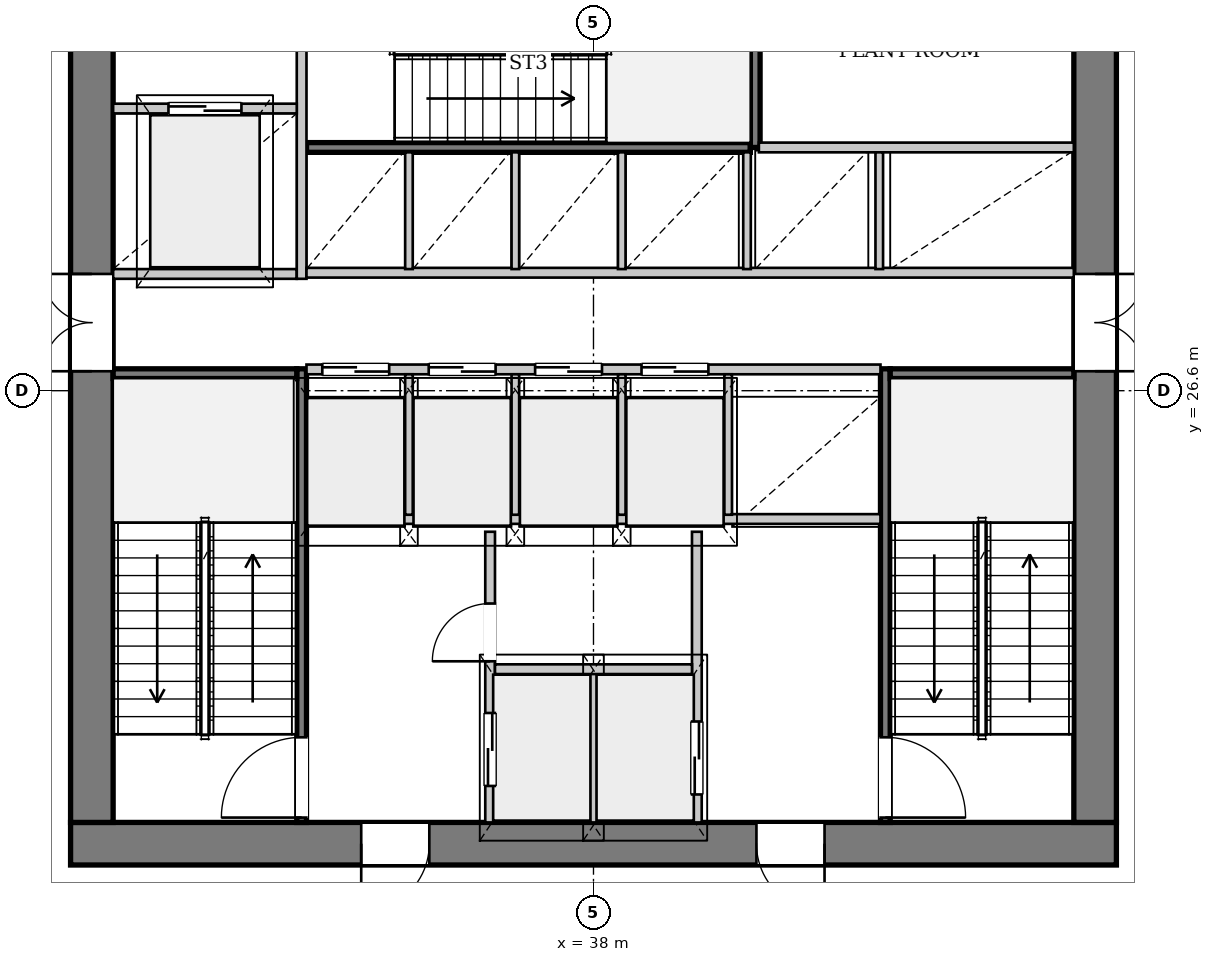
"""IFC4 building model, lengths in metres.
Left out: names, types, materials, properties, quantities, classifications, styles, units other than length and angle.
Written with IfcOpenShell. Run it as: python <this file> out.ifc"""

import sys

from ifc_helpers import new_model, si_unit, direction, frame, frame_2d, origin, place, context, subcontext, project, spatial, rectangle, extrude, source, transform, mapped, element, fill, save


model = new_model("IFC4")
c1 = context("Model", 3, precision=1e-05, world=origin(), true_north=direction((0.0, 1.0)))
c2 = subcontext(c1, "Body", "Model", "MODEL_VIEW")
j1 = project(units=[si_unit("LENGTHUNIT", "METRE"), si_unit("PLANEANGLEUNIT", "RADIAN")], contexts=[c1])
p1 = place(None, origin())
s1 = spatial("IfcSite", under=j1, at=p1, CompositionType="ELEMENT")
p2 = place(p1, origin())
s2 = spatial("IfcBuilding", under=s1, at=p2, CompositionType="ELEMENT")
p3 = place(p2, frame((0.0, 0.0, 79.9)))
s3 = spatial("IfcBuildingStorey", under=s2, at=p3, CompositionType="ELEMENT", Elevation=79.9)
p4 = place(p3, frame((46.6, 19.15, 0.0), z_axis=(0.0, 0.0, 1.0), x_axis=(-1.0, 0.0, 0.0)))
e1 = element("IfcWall", 1, at=p4, inside=s3, PredefinedType="SHEAR", context=c2, shape_type="SweptSolid", body=[
    extrude(rectangle(XDim=17.2, YDim=0.7, at=frame_2d((8.6, 0.0))), origin(), (0.0, 0.0, 1.0), 4.25),
])
p5 = place(p4, frame((4.8, 0.0, 0.0)))
e2 = element("IfcOpeningElement", 2, at=p5, cuts=e1, PredefinedType="OPENING", context=c2, shape_type="SweptSolid", body=[
    extrude(rectangle(XDim=1.12, YDim=2.25, at=frame_2d((0.56, 1.125))), frame((0.0, 0.36, 0.0), z_axis=(0.0, -1.0, 0.0), x_axis=(1.0, 0.0, 0.0)), (0.0, 0.0, 1.0), 0.72),
])
p6 = place(p4, frame((11.3, 0.0, 0.0)))
e3 = element("IfcOpeningElement", 3, at=p6, cuts=e1, PredefinedType="OPENING", context=c2, shape_type="SweptSolid", body=[
    extrude(rectangle(XDim=1.12, YDim=2.25, at=frame_2d((0.56, 1.125))), frame((0.0, 0.36, 0.0), z_axis=(0.0, -1.0, 0.0), x_axis=(1.0, 0.0, 0.0)), (0.0, 0.0, 1.0), 0.72),
])
p7 = place(p3, frame((29.75, 19.5, 0.0), z_axis=(0.0, 0.0, 1.0), x_axis=(0.0, 1.0, 0.0)))
e4 = element("IfcWall", 4, at=p7, inside=s3, PredefinedType="SHEAR", context=c2, shape_type="SweptSolid", body=[
    extrude(rectangle(XDim=14.2, YDim=0.7, at=frame_2d((7.1, 0.0))), origin(), (0.0, 0.0, 1.0), 4.25),
])
p8 = place(p7, frame((7.42, 0.0, 0.0)))
e5 = element("IfcOpeningElement", 5, at=p8, cuts=e4, PredefinedType="OPENING", context=c2, shape_type="SweptSolid", body=[
    extrude(rectangle(XDim=1.6, YDim=2.2, at=frame_2d((0.8, 1.1))), frame((0.0, 0.36, 0.0), z_axis=(0.0, -1.0, 0.0), x_axis=(1.0, 0.0, 0.0)), (0.0, 0.0, 1.0), 0.72),
])
p9 = place(p3, frame((46.25, 33.7, 0.0), z_axis=(0.0, 0.0, 1.0), x_axis=(0.0, -1.0, 0.0)))
e6 = element("IfcWall", 6, at=p9, inside=s3, PredefinedType="SHEAR", context=c2, shape_type="SweptSolid", body=[
    extrude(rectangle(XDim=14.2, YDim=0.7, at=frame_2d((7.1, 0.0))), origin(), (0.0, 0.0, 1.0), 4.25),
])
p10 = place(p9, frame((5.18, 0.0, 0.0)))
e7 = element("IfcOpeningElement", 7, at=p10, cuts=e6, PredefinedType="OPENING", context=c2, shape_type="SweptSolid", body=[
    extrude(rectangle(XDim=1.6, YDim=2.2, at=frame_2d((0.8, 1.1))), frame((0.0, 0.36, 0.0), z_axis=(0.0, -1.0, 0.0), x_axis=(1.0, 0.0, 0.0)), (0.0, 0.0, 1.0), 0.72),
])
p11 = place(p3, frame((33.2, 19.5, 0.0), z_axis=(0.0, 0.0, 1.0), x_axis=(0.0, 1.0, 0.0)))
e8 = element("IfcWall", 8, at=p11, inside=s3, PredefinedType="PARTITIONING", context=c2, shape_type="SweptSolid", body=[
    extrude(rectangle(XDim=7.46, YDim=0.16, at=frame_2d((3.73, 0.0))), origin(), (0.0, 0.0, 1.0), 4.25),
])
p12 = place(p11, frame((0.08, 0.0, 0.0)))
e9 = element("IfcOpeningElement", 9, at=p12, cuts=e8, PredefinedType="OPENING", context=c2, shape_type="SweptSolid", body=[
    extrude(rectangle(XDim=1.32, YDim=2.2, at=frame_2d((0.66, 1.1))), frame((0.0, 0.09, 0.0), z_axis=(0.0, -1.0, 0.0), x_axis=(1.0, 0.0, 0.0)), (0.0, 0.0, 1.0), 0.18),
])
p13 = place(p3, frame((30.1, 26.88, 0.0), z_axis=(0.0, 0.0, 1.0), x_axis=(1.0, 0.0, 0.0)))
e10 = element("IfcWall", 10, at=p13, inside=s3, PredefinedType="PARTITIONING", context=c2, shape_type="SweptSolid", body=[
    extrude(rectangle(XDim=3.02, YDim=0.16, at=frame_2d((1.51, 0.0))), origin(), (0.0, 0.0, 1.0), 4.25),
])
p14 = place(p3, frame((42.8, 26.96, 0.0), z_axis=(0.0, 0.0, 1.0), x_axis=(0.0, -1.0, 0.0)))
e11 = element("IfcWall", 11, at=p14, inside=s3, PredefinedType="PARTITIONING", context=c2, shape_type="SweptSolid", body=[
    extrude(rectangle(XDim=7.46, YDim=0.16, at=frame_2d((3.73, 0.0))), origin(), (0.0, 0.0, 1.0), 4.25),
])
p15 = place(p14, frame((6.06, 0.0, 0.0)))
e12 = element("IfcOpeningElement", 12, at=p15, cuts=e11, PredefinedType="OPENING", context=c2, shape_type="SweptSolid", body=[
    extrude(rectangle(XDim=1.32, YDim=2.2, at=frame_2d((0.66, 1.1))), frame((0.0, 0.09, 0.0), z_axis=(0.0, -1.0, 0.0), x_axis=(1.0, 0.0, 0.0)), (0.0, 0.0, 1.0), 0.18),
])
p16 = place(p3, frame((42.88, 26.88, 0.0), z_axis=(0.0, 0.0, 1.0), x_axis=(1.0, 0.0, 0.0)))
e13 = element("IfcWall", 13, at=p16, inside=s3, PredefinedType="PARTITIONING", context=c2, shape_type="SweptSolid", body=[
    extrude(rectangle(XDim=3.02, YDim=0.16, at=frame_2d((1.51, 0.0))), origin(), (0.0, 0.0, 1.0), 4.25),
])
p17 = place(p3, frame((33.28, 30.6, 0.0), z_axis=(0.0, 0.0, 1.0), x_axis=(1.0, 0.0, 0.0)))
e14 = element("IfcWall", 14, at=p17, inside=s3, PredefinedType="PARTITIONING", context=c2, shape_type="SweptSolid", body=[
    extrude(rectangle(XDim=7.3, YDim=0.16, at=frame_2d((3.65, 0.0))), origin(), (0.0, 0.0, 1.0), 4.25),
])
p18 = place(p3, frame((40.66, 30.6, 0.0), z_axis=(0.0, 0.0, 1.0), x_axis=(0.0, 1.0, 0.0)))
e15 = element("IfcWall", 15, at=p18, inside=s3, PredefinedType="PARTITIONING", context=c2, shape_type="SweptSolid", body=[
    extrude(rectangle(XDim=3.1, YDim=0.16, at=frame_2d((1.55, 0.0))), origin(), (0.0, 0.0, 1.0), 4.25),
])
p19 = place(p3, frame((36.3, 19.5, 0.0), z_axis=(0.0, 0.0, 1.0), x_axis=(0.0, 1.0, 0.0)))
e16 = element("IfcWall", 16, at=p19, inside=s3, PredefinedType="PARTITIONING", context=c2, shape_type="SweptSolid", body=[
    extrude(rectangle(XDim=4.78, YDim=0.16, at=frame_2d((2.39, 0.0))), origin(), (0.0, 0.0, 1.0), 4.25),
])
p20 = place(p19, frame((0.6, 0.0, 0.0)))
e17 = element("IfcOpeningElement", 17, at=p20, cuts=e16, PredefinedType="OPENING", context=c2, shape_type="SweptSolid", body=[
    extrude(rectangle(XDim=1.2, YDim=2.2, at=frame_2d((0.6, 1.1))), frame((0.0, 0.09, 0.0), z_axis=(0.0, -1.0, 0.0), x_axis=(1.0, 0.0, 0.0)), (0.0, 0.0, 1.0), 0.18),
])
p21 = place(p19, frame((2.65, 0.0, 0.0)))
e18 = element("IfcOpeningElement", 18, at=p21, cuts=e16, PredefinedType="OPENING", context=c2, shape_type="SweptSolid", body=[
    extrude(rectangle(XDim=0.95, YDim=2.1, at=frame_2d((0.475, 1.05))), frame((0.0, 0.09, 0.0), z_axis=(0.0, -1.0, 0.0), x_axis=(1.0, 0.0, 0.0)), (0.0, 0.0, 1.0), 0.18),
])
p22 = place(p3, frame((39.7, 24.28, 0.0), z_axis=(0.0, 0.0, 1.0), x_axis=(0.0, -1.0, 0.0)))
e19 = element("IfcWall", 19, at=p22, inside=s3, PredefinedType="PARTITIONING", context=c2, shape_type="SweptSolid", body=[
    extrude(rectangle(XDim=4.78, YDim=0.16, at=frame_2d((2.39, 0.0))), origin(), (0.0, 0.0, 1.0), 4.25),
])
p23 = place(p22, frame((3.12, 0.0, 0.0)))
e20 = element("IfcOpeningElement", 20, at=p23, cuts=e19, PredefinedType="OPENING", context=c2, shape_type="SweptSolid", body=[
    extrude(rectangle(XDim=1.2, YDim=2.2, at=frame_2d((0.6, 1.1))), frame((0.0, 0.09, 0.0), z_axis=(0.0, -1.0, 0.0), x_axis=(1.0, 0.0, 0.0)), (0.0, 0.0, 1.0), 0.18),
])
p24 = place(p3, frame((38.0, 19.5, 0.0), z_axis=(0.0, 0.0, 1.0), x_axis=(0.0, 1.0, 0.0)))
e21 = element("IfcWall", 21, at=p24, inside=s3, PredefinedType="PARTITIONING", context=c2, shape_type="SweptSolid", body=[
    extrude(rectangle(XDim=2.46, YDim=0.125, at=frame_2d((1.23, 0.0))), origin(), (0.0, 0.0, 1.0), 4.25),
])
p25 = place(p3, frame((36.38, 22.02, 0.0), z_axis=(0.0, 0.0, 1.0), x_axis=(1.0, 0.0, 0.0)))
e22 = element("IfcWall", 22, at=p25, inside=s3, PredefinedType="PARTITIONING", context=c2, shape_type="SweptSolid", body=[
    extrude(rectangle(XDim=3.24, YDim=0.16, at=frame_2d((1.62, 0.0))), origin(), (0.0, 0.0, 1.0), 4.25),
])
p26 = place(p3, frame((33.28, 24.49, 0.0), z_axis=(0.0, 0.0, 1.0), x_axis=(1.0, 0.0, 0.0)))
e23 = element("IfcWall", 23, at=p26, inside=s3, PredefinedType="PARTITIONING", context=c2, shape_type="SweptSolid", body=[
    extrude(rectangle(XDim=9.44, YDim=0.16, at=frame_2d((4.72, 0.0))), origin(), (0.0, 0.0, 1.0), 4.25),
])
p27 = place(p3, frame((30.1, 28.52, 0.0), z_axis=(0.0, 0.0, 1.0), x_axis=(1.0, 0.0, 0.0)))
e24 = element("IfcWall", 24, at=p27, inside=s3, PredefinedType="PARTITIONING", context=c2, shape_type="SweptSolid", body=[
    extrude(rectangle(XDim=3.02, YDim=0.16, at=frame_2d((1.51, 0.0))), origin(), (0.0, 0.0, 1.0), 4.25),
])
p28 = place(p3, frame((33.2, 28.44, 0.0), z_axis=(0.0, 0.0, 1.0), x_axis=(0.0, 1.0, 0.0)))
e25 = element("IfcWall", 25, at=p28, inside=s3, PredefinedType="PARTITIONING", context=c2, shape_type="SweptSolid", body=[
    extrude(rectangle(XDim=5.26, YDim=0.16, at=frame_2d((2.63, 0.0))), origin(), (0.0, 0.0, 1.0), 4.25),
])
p29 = place(p3, frame((30.1, 31.24, 0.0), z_axis=(0.0, 0.0, 1.0), x_axis=(1.0, 0.0, 0.0)))
e26 = element("IfcWall", 26, at=p29, inside=s3, PredefinedType="PARTITIONING", context=c2, shape_type="SweptSolid", body=[
    extrude(rectangle(XDim=3.02, YDim=0.16, at=frame_2d((1.51, 0.0))), origin(), (0.0, 0.0, 1.0), 4.25),
])
p30 = place(p29, frame((0.91, 0.0, 0.0)))
e27 = element("IfcOpeningElement", 27, at=p30, cuts=e26, PredefinedType="OPENING", context=c2, shape_type="SweptSolid", body=[
    extrude(rectangle(XDim=1.2, YDim=2.2, at=frame_2d((0.6, 1.1))), frame((0.0, 0.09, 0.0), z_axis=(0.0, -1.0, 0.0), x_axis=(1.0, 0.0, 0.0)), (0.0, 0.0, 1.0), 0.18),
])
p31 = place(p3, frame((33.28, 26.95, 0.0), z_axis=(0.0, 0.0, 1.0), x_axis=(1.0, 0.0, 0.0)))
e28 = element("IfcWall", 28, at=p31, inside=s3, PredefinedType="PARTITIONING", context=c2, shape_type="SweptSolid", body=[
    extrude(rectangle(XDim=9.44, YDim=0.16, at=frame_2d((4.72, 0.0))), origin(), (0.0, 0.0, 1.0), 4.25),
])
p32 = place(p31, frame((0.26, 0.0, 0.0)))
e29 = element("IfcOpeningElement", 29, at=p32, cuts=e28, PredefinedType="OPENING", context=c2, shape_type="SweptSolid", body=[
    extrude(rectangle(XDim=1.1, YDim=2.2, at=frame_2d((0.55, 1.1))), frame((0.0, 0.09, 0.0), z_axis=(0.0, -1.0, 0.0), x_axis=(1.0, 0.0, 0.0)), (0.0, 0.0, 1.0), 0.18),
])
p33 = place(p31, frame((2.01, 0.0, 0.0)))
e30 = element("IfcOpeningElement", 30, at=p33, cuts=e28, PredefinedType="OPENING", context=c2, shape_type="SweptSolid", body=[
    extrude(rectangle(XDim=1.1, YDim=2.2, at=frame_2d((0.55, 1.1))), frame((0.0, 0.09, 0.0), z_axis=(0.0, -1.0, 0.0), x_axis=(1.0, 0.0, 0.0)), (0.0, 0.0, 1.0), 0.18),
])
p34 = place(p31, frame((3.76, 0.0, 0.0)))
e31 = element("IfcOpeningElement", 31, at=p34, cuts=e28, PredefinedType="OPENING", context=c2, shape_type="SweptSolid", body=[
    extrude(rectangle(XDim=1.1, YDim=2.2, at=frame_2d((0.55, 1.1))), frame((0.0, 0.09, 0.0), z_axis=(0.0, -1.0, 0.0), x_axis=(1.0, 0.0, 0.0)), (0.0, 0.0, 1.0), 0.18),
])
p35 = place(p31, frame((5.51, 0.0, 0.0)))
e32 = element("IfcOpeningElement", 32, at=p35, cuts=e28, PredefinedType="OPENING", context=c2, shape_type="SweptSolid", body=[
    extrude(rectangle(XDim=1.1, YDim=2.2, at=frame_2d((0.55, 1.1))), frame((0.0, 0.09, 0.0), z_axis=(0.0, -1.0, 0.0), x_axis=(1.0, 0.0, 0.0)), (0.0, 0.0, 1.0), 0.18),
])
for number, where, z_axis, x_axis in (
    (33, (34.965, 24.56, 0.0), (0.0, 0.0, 1.0), (0.0, 1.0, 0.0)),
    (34, (36.715, 24.56, 0.0), (0.0, 0.0, 1.0), (0.0, 1.0, 0.0)),
    (35, (38.465, 24.56, 0.0), (0.0, 0.0, 1.0), (0.0, 1.0, 0.0)),
    (36, (40.215, 24.56, 0.0), (0.0, 0.0, 1.0), (0.0, 1.0, 0.0)),
):
    element("IfcWall", number, at=place(p3, frame(where, z_axis=z_axis, x_axis=x_axis)), inside=s3, PredefinedType="PARTITIONING", context=c2, shape_type="SweptSolid", body=[
        extrude(rectangle(XDim=2.31, YDim=0.125, at=frame_2d((1.155, 0.0))), origin(), (0.0, 0.0, 1.0), 4.25),
    ])
p36 = place(p3, frame((33.28, 28.54, 0.0), z_axis=(0.0, 0.0, 1.0), x_axis=(1.0, 0.0, 0.0)))
e37 = element("IfcWall", 37, at=p36, inside=s3, PredefinedType="PARTITIONING", context=c2, shape_type="SweptSolid", body=[
    extrude(rectangle(XDim=12.62, YDim=0.16, at=frame_2d((6.31, 0.0))), origin(), (0.0, 0.0, 1.0), 4.25),
])
p37 = place(p3, frame((40.72, 30.6, 0.0), z_axis=(0.0, 0.0, 1.0), x_axis=(1.0, 0.0, 0.0)))
e38 = element("IfcWall", 38, at=p37, inside=s3, PredefinedType="PARTITIONING", context=c2, shape_type="SweptSolid", body=[
    extrude(rectangle(XDim=5.18, YDim=0.16, at=frame_2d((2.59, 0.0))), origin(), (0.0, 0.0, 1.0), 4.25),
])
for number, where, z_axis, x_axis in (
    (39, (34.965, 28.6, 0.0), (0.0, 0.0, 1.0), (0.0, 1.0, 0.0)),
    (40, (36.715, 28.6, 0.0), (0.0, 0.0, 1.0), (0.0, 1.0, 0.0)),
    (41, (38.465, 28.6, 0.0), (0.0, 0.0, 1.0), (0.0, 1.0, 0.0)),
    (42, (40.525, 28.6, 0.0), (0.0, 0.0, 1.0), (0.0, 1.0, 0.0)),
    (43, (42.7, 28.6, 0.0), (0.0, 0.0, 1.0), (0.0, 1.0, 0.0)),
):
    element("IfcWall", number, at=place(p3, frame(where, z_axis=z_axis, x_axis=x_axis)), inside=s3, PredefinedType="PARTITIONING", context=c2, shape_type="SweptSolid", body=[
        extrude(rectangle(XDim=1.92, YDim=0.125, at=frame_2d((0.96, 0.0))), origin(), (0.0, 0.0, 1.0), 4.25),
    ])
m1 = source(origin(), c2, "Body", "SweptSolid", [
    extrude(rectangle(XDim=1.12, YDim=2.25, at=frame_2d((0.56, 1.125))), frame((0.0, 0.025, 0.0), z_axis=(0.0, -1.0, 0.0), x_axis=(1.0, 0.0, 0.0)), (0.0, 0.0, 1.0), 0.05),
])
p38 = place(p5, origin())
e44 = element("IfcDoor", 44, at=p38, inside=s3, OperationType="SINGLE_SWING_LEFT", PredefinedType="DOOR", context=c2, shape_type="MappedRepresentation", body=[
    mapped(m1, transform((0.0, 0.0, 0.0), x_axis=(1.0, 0.0, 0.0), y_axis=(0.0, 1.0, 0.0), z_axis=(0.0, 0.0, 1.0), scale=1.0)),
])
fill(e2, e44)
p39 = place(p6, origin())
e45 = element("IfcDoor", 45, at=p39, inside=s3, OperationType="SINGLE_SWING_RIGHT", PredefinedType="DOOR", context=c2, shape_type="MappedRepresentation", body=[
    mapped(m1, transform((0.0, 0.0, 0.0), x_axis=(1.0, 0.0, 0.0), y_axis=(0.0, 1.0, 0.0), z_axis=(0.0, 0.0, 1.0), scale=1.0)),
])
fill(e3, e45)
m2 = source(origin(), c2, "Body", "SweptSolid", [
    extrude(rectangle(XDim=1.6, YDim=2.2, at=frame_2d((0.8, 1.1))), frame((0.0, 0.025, 0.0), z_axis=(0.0, -1.0, 0.0), x_axis=(1.0, 0.0, 0.0)), (0.0, 0.0, 1.0), 0.05),
])
p40 = place(p8, origin())
e46 = element("IfcDoor", 46, at=p40, inside=s3, OperationType="DOUBLE_DOOR_SINGLE_SWING", PredefinedType="DOOR", context=c2, shape_type="MappedRepresentation", body=[
    mapped(m2, transform((0.0, 0.0, 0.0), x_axis=(1.0, 0.0, 0.0), y_axis=(0.0, 1.0, 0.0), z_axis=(0.0, 0.0, 1.0), scale=1.0)),
])
fill(e5, e46)
p41 = place(p10, origin())
e47 = element("IfcDoor", 47, at=p41, inside=s3, OperationType="DOUBLE_DOOR_SINGLE_SWING", PredefinedType="DOOR", context=c2, shape_type="MappedRepresentation", body=[
    mapped(m2, transform((0.0, 0.0, 0.0), x_axis=(1.0, 0.0, 0.0), y_axis=(0.0, 1.0, 0.0), z_axis=(0.0, 0.0, 1.0), scale=1.0)),
])
fill(e7, e47)
m3 = source(origin(), c2, "Body", "SweptSolid", [
    extrude(rectangle(XDim=1.32, YDim=2.2, at=frame_2d((0.66, 1.1))), frame((0.0, 0.025, 0.0), z_axis=(0.0, -1.0, 0.0), x_axis=(1.0, 0.0, 0.0)), (0.0, 0.0, 1.0), 0.05),
])
p42 = place(p12, origin())
e48 = element("IfcDoor", 48, at=p42, inside=s3, OperationType="SINGLE_SWING_LEFT", PredefinedType="DOOR", context=c2, shape_type="MappedRepresentation", body=[
    mapped(m3, transform((0.0, 0.0, 0.0), x_axis=(1.0, 0.0, 0.0), y_axis=(0.0, 1.0, 0.0), z_axis=(0.0, 0.0, 1.0), scale=1.0)),
])
fill(e9, e48)
p43 = place(p15, origin())
e49 = element("IfcDoor", 49, at=p43, inside=s3, OperationType="SINGLE_SWING_RIGHT", PredefinedType="DOOR", context=c2, shape_type="MappedRepresentation", body=[
    mapped(m3, transform((0.0, 0.0, 0.0), x_axis=(1.0, 0.0, 0.0), y_axis=(0.0, 1.0, 0.0), z_axis=(0.0, 0.0, 1.0), scale=1.0)),
])
fill(e12, e49)
m4 = source(origin(), c2, "Body", "SweptSolid", [
    extrude(rectangle(XDim=1.2, YDim=2.2, at=frame_2d((0.6, 1.1))), frame((0.0, 0.025, 0.0), z_axis=(0.0, -1.0, 0.0), x_axis=(1.0, 0.0, 0.0)), (0.0, 0.0, 1.0), 0.05),
])
p44 = place(p20, origin())
e50 = element("IfcDoor", 50, at=p44, inside=s3, OperationType="DOUBLE_DOOR_SLIDING", PredefinedType="DOOR", context=c2, shape_type="MappedRepresentation", body=[
    mapped(m4, transform((0.0, 0.0, 0.0), x_axis=(1.0, 0.0, 0.0), y_axis=(0.0, 1.0, 0.0), z_axis=(0.0, 0.0, 1.0), scale=1.0)),
])
fill(e17, e50)
m5 = source(origin(), c2, "Body", "SweptSolid", [
    extrude(rectangle(XDim=0.95, YDim=2.1, at=frame_2d((0.475, 1.05))), frame((0.0, 0.025, 0.0), z_axis=(0.0, -1.0, 0.0), x_axis=(1.0, 0.0, 0.0)), (0.0, 0.0, 1.0), 0.05),
])
p45 = place(p21, origin())
e51 = element("IfcDoor", 51, at=p45, inside=s3, OperationType="SINGLE_SWING_LEFT", PredefinedType="DOOR", context=c2, shape_type="MappedRepresentation", body=[
    mapped(m5, transform((0.0, 0.0, 0.0), x_axis=(1.0, 0.0, 0.0), y_axis=(0.0, 1.0, 0.0), z_axis=(0.0, 0.0, 1.0), scale=1.0)),
])
fill(e18, e51)
p46 = place(p23, origin())
e52 = element("IfcDoor", 52, at=p46, inside=s3, OperationType="DOUBLE_DOOR_SLIDING", PredefinedType="DOOR", context=c2, shape_type="MappedRepresentation", body=[
    mapped(m4, transform((0.0, 0.0, 0.0), x_axis=(1.0, 0.0, 0.0), y_axis=(0.0, 1.0, 0.0), z_axis=(0.0, 0.0, 1.0), scale=1.0)),
])
fill(e20, e52)
p47 = place(p30, origin())
e53 = element("IfcDoor", 53, at=p47, inside=s3, OperationType="DOUBLE_DOOR_SLIDING", PredefinedType="DOOR", context=c2, shape_type="MappedRepresentation", body=[
    mapped(m4, transform((0.0, 0.0, 0.0), x_axis=(1.0, 0.0, 0.0), y_axis=(0.0, 1.0, 0.0), z_axis=(0.0, 0.0, 1.0), scale=1.0)),
])
fill(e27, e53)
m6 = source(origin(), c2, "Body", "SweptSolid", [
    extrude(rectangle(XDim=1.1, YDim=2.2, at=frame_2d((0.55, 1.1))), frame((0.0, 0.025, 0.0), z_axis=(0.0, -1.0, 0.0), x_axis=(1.0, 0.0, 0.0)), (0.0, 0.0, 1.0), 0.05),
])
p48 = place(p32, origin())
e54 = element("IfcDoor", 54, at=p48, inside=s3, OperationType="DOUBLE_DOOR_SLIDING", PredefinedType="DOOR", context=c2, shape_type="MappedRepresentation", body=[
    mapped(m6, transform((0.0, 0.0, 0.0), x_axis=(1.0, 0.0, 0.0), y_axis=(0.0, 1.0, 0.0), z_axis=(0.0, 0.0, 1.0), scale=1.0)),
])
fill(e29, e54)
p49 = place(p33, origin())
e55 = element("IfcDoor", 55, at=p49, inside=s3, OperationType="DOUBLE_DOOR_SLIDING", PredefinedType="DOOR", context=c2, shape_type="MappedRepresentation", body=[
    mapped(m6, transform((0.0, 0.0, 0.0), x_axis=(1.0, 0.0, 0.0), y_axis=(0.0, 1.0, 0.0), z_axis=(0.0, 0.0, 1.0), scale=1.0)),
])
fill(e30, e55)
p50 = place(p34, origin())
e56 = element("IfcDoor", 56, at=p50, inside=s3, OperationType="DOUBLE_DOOR_SLIDING", PredefinedType="DOOR", context=c2, shape_type="MappedRepresentation", body=[
    mapped(m6, transform((0.0, 0.0, 0.0), x_axis=(1.0, 0.0, 0.0), y_axis=(0.0, 1.0, 0.0), z_axis=(0.0, 0.0, 1.0), scale=1.0)),
])
fill(e31, e56)
p51 = place(p35, origin())
e57 = element("IfcDoor", 57, at=p51, inside=s3, OperationType="DOUBLE_DOOR_SLIDING", PredefinedType="DOOR", context=c2, shape_type="MappedRepresentation", body=[
    mapped(m6, transform((0.0, 0.0, 0.0), x_axis=(1.0, 0.0, 0.0), y_axis=(0.0, 1.0, 0.0), z_axis=(0.0, 0.0, 1.0), scale=1.0)),
])
fill(e32, e57)
save(model, sys.argv[1])
